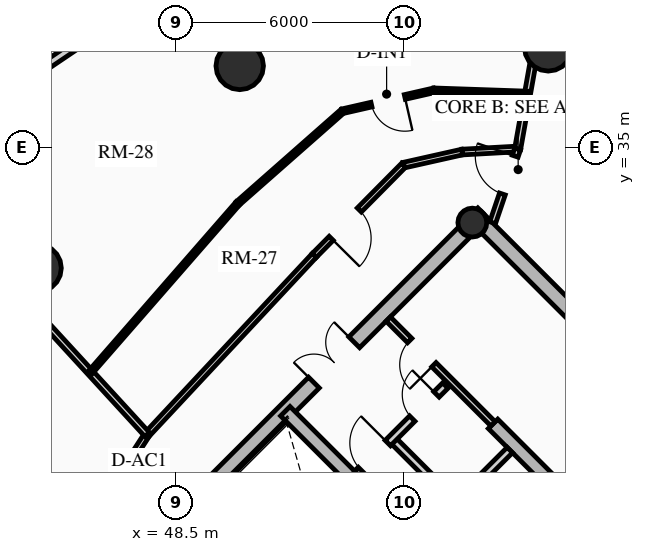
"""IFC4 building model, lengths in metres.
Left out: names, types, materials, properties, quantities, classifications, styles, units other than length and angle.
Written with IfcOpenShell. Run it as: python <this file> out.ifc"""

import sys

from ifc_helpers import new_model, si_unit, direction, frame, frame_2d, origin, origin_2d, place, context, subcontext, project, spatial, rectangle, circle, hollow_circle, extrude, source, transform, mapped, element, fill, save


model = new_model("IFC4")
c1 = context("Model", 3, precision=1e-05, world=origin(), true_north=direction((0.0, 1.0)))
c2 = subcontext(c1, "Body", "Model", "MODEL_VIEW")
j1 = project(units=[si_unit("LENGTHUNIT", "METRE"), si_unit("PLANEANGLEUNIT", "RADIAN")], contexts=[c1])
p1 = place(None, origin())
s1 = spatial("IfcSite", under=j1, at=p1, CompositionType="ELEMENT")
p2 = place(p1, origin())
s2 = spatial("IfcBuilding", under=s1, at=p2, CompositionType="ELEMENT")
p3 = place(p2, frame((0.0, 0.0, 160.33)))
s3 = spatial("IfcBuildingStorey", under=s2, at=p3, CompositionType="ELEMENT", Elevation=160.33)
p4 = place(p3, frame((66.268, 23.298, 0.0), z_axis=(0.0, 0.0, 1.0), x_axis=(-0.707106781187, 0.707106781187, 0.0)))
e1 = element("IfcWall", 1, at=p4, inside=s3, PredefinedType="SHEAR", context=c2, shape_type="SweptSolid", body=[
    extrude(rectangle(XDim=14.1, YDim=0.4, at=frame_2d((7.05, 0.0))), origin(), (0.0, 0.0, 1.0), 2.91),
])
p5 = place(p3, frame((48.873, 25.561, 0.0), z_axis=(0.0, 0.0, 1.0), x_axis=(0.707106781187, 0.707106781187, 0.0)))
e2 = element("IfcWall", 2, at=p5, inside=s3, PredefinedType="SHEAR", context=c2, shape_type="SweptSolid", body=[
    extrude(rectangle(XDim=10.7, YDim=0.4, at=frame_2d((5.35, 0.0))), origin(), (0.0, 0.0, 1.0), 2.91),
])
m1 = source(origin(), c2, "Body", "SweptSolid", [
    extrude(rectangle(XDim=1.5, YDim=2.02, at=frame_2d((0.75, 1.01))), frame((0.0, 0.21, 0.0), z_axis=(0.0, -1.0, 0.0), x_axis=(1.0, 0.0, 0.0)), (0.0, 0.0, 1.0), 0.42),
])
p6 = place(p5, frame((4.6, 0.0, 0.0)))
e3 = element("IfcOpeningElement", 3, at=p6, cuts=e2, PredefinedType="OPENING", context=c2, shape_type="MappedRepresentation", body=[
    mapped(m1, transform((0.0, 0.0, 0.0), x_axis=(1.0, 0.0, 0.0), y_axis=(0.0, 1.0, 0.0), z_axis=(0.0, 0.0, 1.0), scale=1.0)),
])
p7 = place(p3, frame((61.06, 18.373, 0.0), z_axis=(0.0, 0.0, 1.0), x_axis=(-0.707106781187, 0.707106781187, 0.0)))
e4 = element("IfcWall", 4, at=p7, inside=s3, PredefinedType="SHEAR", context=c2, shape_type="SweptSolid", body=[
    extrude(rectangle(XDim=13.7, YDim=0.35, at=frame_2d((6.85, 0.0))), origin(), (0.0, 0.0, 1.0), 2.91),
])
m2 = source(origin(), c2, "Body", "SweptSolid", [
    extrude(rectangle(XDim=1.1, YDim=2.015, at=frame_2d((0.55, 1.007))), frame((0.0, 0.185, 0.0), z_axis=(0.0, -1.0, 0.0), x_axis=(1.0, 0.0, 0.0)), (0.0, 0.0, 1.0), 0.37),
])
p8 = place(p7, frame((4.85, 0.0, 0.0)))
e5 = element("IfcOpeningElement", 5, at=p8, cuts=e4, PredefinedType="OPENING", context=c2, shape_type="MappedRepresentation", body=[
    mapped(m2, transform((0.0, 0.0, 0.0), x_axis=(1.0, 0.0, 0.0), y_axis=(0.0, 1.0, 0.0), z_axis=(0.0, 0.0, 1.0), scale=1.0)),
])
p9 = place(p7, frame((0.625, 0.0, 0.0)))
e6 = element("IfcOpeningElement", 6, at=p9, cuts=e4, PredefinedType="OPENING", context=c2, shape_type="MappedRepresentation", body=[
    mapped(m2, transform((0.0, 0.0, 0.0), x_axis=(1.0, 0.0, 0.0), y_axis=(0.0, 1.0, 0.0), z_axis=(0.0, 0.0, 1.0), scale=1.0)),
])
p10 = place(p7, frame((2.625, 0.0, 0.0)))
e7 = element("IfcOpeningElement", 7, at=p10, cuts=e4, PredefinedType="OPENING", context=c2, shape_type="MappedRepresentation", body=[
    mapped(m2, transform((0.0, 0.0, 0.0), x_axis=(1.0, 0.0, 0.0), y_axis=(0.0, 1.0, 0.0), z_axis=(0.0, 0.0, 1.0), scale=1.0)),
])
m3 = source(origin(), c2, "Body", "SweptSolid", [
    extrude(rectangle(XDim=1.15, YDim=2.02, at=frame_2d((0.575, 1.01))), frame((0.0, 0.185, 0.0), z_axis=(0.0, -1.0, 0.0), x_axis=(1.0, 0.0, 0.0)), (0.0, 0.0, 1.0), 0.37),
])
p11 = place(p7, frame((7.27, 0.0, 0.0)))
e8 = element("IfcOpeningElement", 8, at=p11, cuts=e4, PredefinedType="OPENING", context=c2, shape_type="MappedRepresentation", body=[
    mapped(m3, transform((0.0, 0.0, 0.0), x_axis=(1.0, 0.0, 0.0), y_axis=(0.0, 1.0, 0.0), z_axis=(0.0, 0.0, 1.0), scale=1.0)),
])
p12 = place(p3, frame((63.627, 20.94, 0.0), z_axis=(0.0, 0.0, 1.0), x_axis=(-0.707119496762, 0.707094065383, 0.0)))
e9 = element("IfcWall", 9, at=p12, inside=s3, PredefinedType="SHEAR", context=c2, shape_type="SweptSolid", body=[
    extrude(rectangle(XDim=9.6, YDim=0.35, at=frame_2d((4.8, 0.0))), origin(), (0.0, 0.0, 1.0), 2.91),
])
p13 = place(p12, frame((5.28, 0.0, 0.0)))
e10 = element("IfcOpeningElement", 10, at=p13, cuts=e9, PredefinedType="OPENING", context=c2, shape_type="MappedRepresentation", body=[
    mapped(m3, transform((0.0, 0.0, 0.0), x_axis=(1.0, 0.0, 0.0), y_axis=(0.0, 1.0, 0.0), z_axis=(0.0, 0.0, 1.0), scale=1.0)),
])
p14 = place(p3, frame((56.294, 33.024, 0.0), z_axis=(0.0, 0.0, 1.0), x_axis=(0.707106781187, 0.707106781187, 0.0)))
e11 = element("IfcColumn", 11, at=p14, inside=s3, PredefinedType="COLUMN", context=c2, shape_type="SweptSolid", body=[
    extrude(hollow_circle(Radius=0.38, WallThickness=0.032, at=origin_2d()), origin(), (0.0, 0.0, 1.0), 2.91),
])
for number, where, z_axis, x_axis in (
    (12, (58.291, 37.635, 0.0), (0.0, 0.0, 1.0), (1.0, 0.0, 0.0)),
    (13, (50.173, 37.146, 0.0), (0.0, 0.0, 1.0), (1.0, 0.0, 0.0)),
    (14, (44.854, 31.827, 0.0), (0.0, 0.0, 1.0), (1.0, 0.0, 0.0)),
):
    element("IfcColumn", number, at=place(p3, frame(where, z_axis=z_axis, x_axis=x_axis)), inside=s3, PredefinedType="USERDEFINED", context=c2, shape_type="SweptSolid", body=[
        extrude(circle(Radius=0.625, at=origin_2d()), origin(), (0.0, 0.0, 1.0), 2.91),
    ])
p15 = place(p3, frame((44.935, 37.065, 0.0), z_axis=(0.0, 0.0, 1.0), x_axis=(0.828739009952, 0.559635286042, 0.0)))
e15 = element("IfcWall", 15, at=p15, inside=s3, PredefinedType="SOLIDWALL", context=c2, shape_type="SweptSolid", body=[
    extrude(rectangle(XDim=4.569, YDim=0.22, at=frame_2d((2.284, 0.0))), origin(), (0.0, 0.0, 1.0), 2.245),
])
p16 = place(p3, frame((54.961, 24.719, 0.0), z_axis=(0.0, 0.0, 1.0), x_axis=(0.707106781187, 0.707106781187, 0.0)))
e16 = element("IfcWall", 16, at=p16, inside=s3, PredefinedType="PARTITIONING", context=c2, shape_type="SweptSolid", body=[
    extrude(rectangle(XDim=3.28, YDim=0.2, at=frame_2d((1.64, 0.0))), origin(), (0.0, 0.0, 1.0), 2.675),
])
m4 = source(origin(), c2, "Body", "SweptSolid", [
    extrude(rectangle(XDim=0.9, YDim=2.005, at=frame_2d((0.45, 1.002))), frame((0.0, 0.11, 0.0), z_axis=(0.0, -1.0, 0.0), x_axis=(1.0, 0.0, 0.0)), (0.0, 0.0, 1.0), 0.22),
])
p17 = place(p16, frame((0.16, 0.0, 0.0)))
e17 = element("IfcOpeningElement", 17, at=p17, cuts=e16, PredefinedType="OPENING", context=c2, shape_type="MappedRepresentation", body=[
    mapped(m4, transform((0.0, 0.0, 0.0), x_axis=(1.0, 0.0, 0.0), y_axis=(0.0, 1.0, 0.0), z_axis=(0.0, 0.0, 1.0), scale=1.0)),
])
p18 = place(p3, frame((55.874, 25.631, 0.0), z_axis=(0.0, 0.0, 1.0), x_axis=(-0.707157639372, 0.707055919343, 0.0)))
e18 = element("IfcWall", 18, at=p18, inside=s3, PredefinedType="PARTITIONING", context=c2, shape_type="SweptSolid", body=[
    extrude(rectangle(XDim=2.4, YDim=0.2, at=frame_2d((1.2, 0.0))), origin(), (0.0, 0.0, 1.0), 2.675),
])
p19 = place(p3, frame((53.264, 26.416, 0.0), z_axis=(0.0, 0.0, 1.0), x_axis=(0.707106781187, 0.707106781187, 0.0)))
e19 = element("IfcWall", 19, at=p19, inside=s3, PredefinedType="PARTITIONING", context=c2, shape_type="SweptSolid", body=[
    extrude(rectangle(XDim=3.28, YDim=0.2, at=frame_2d((1.64, 0.0))), origin(), (0.0, 0.0, 1.0), 2.675),
])
m5 = source(origin(), c2, "Body", "SweptSolid", [
    extrude(rectangle(XDim=1.0, YDim=2.015, at=frame_2d((0.5, 1.007))), frame((0.0, 0.11, 0.0), z_axis=(0.0, -1.0, 0.0), x_axis=(1.0, 0.0, 0.0)), (0.0, 0.0, 1.0), 0.22),
])
p20 = place(p19, frame((0.14, 0.0, 0.0)))
e20 = element("IfcOpeningElement", 20, at=p20, cuts=e19, PredefinedType="OPENING", context=c2, shape_type="MappedRepresentation", body=[
    mapped(m5, transform((0.0, 0.0, 0.0), x_axis=(1.0, 0.0, 0.0), y_axis=(0.0, 1.0, 0.0), z_axis=(0.0, 0.0, 1.0), scale=1.0)),
])
p21 = place(p19, frame((2.05, 0.0, 0.0)))
e21 = element("IfcOpeningElement", 21, at=p21, cuts=e19, PredefinedType="OPENING", context=c2, shape_type="MappedRepresentation", body=[
    mapped(m4, transform((0.0, 0.0, 0.0), x_axis=(1.0, 0.0, 0.0), y_axis=(0.0, 1.0, 0.0), z_axis=(0.0, 0.0, 1.0), scale=1.0)),
])
p22 = place(p3, frame((56.839, 27.728, 0.0), z_axis=(0.0, 0.0, 1.0), x_axis=(-0.707106781187, 0.707106781187, 0.0)))
e22 = element("IfcWall", 22, at=p22, inside=s3, PredefinedType="PARTITIONING", context=c2, shape_type="SweptSolid", body=[
    extrude(rectangle(XDim=3.9, YDim=0.16, at=frame_2d((1.95, 0.0))), origin(), (0.0, 0.0, 1.0), 2.675),
])
m6 = source(origin(), c2, "Body", "SweptSolid", [
    extrude(rectangle(XDim=0.9, YDim=2.005, at=frame_2d((0.45, 1.002))), frame((0.0, 0.09, 0.0), z_axis=(0.0, -1.0, 0.0), x_axis=(1.0, 0.0, 0.0)), (0.0, 0.0, 1.0), 0.18),
])
p23 = place(p22, frame((2.2, 0.0, 0.0)))
e23 = element("IfcOpeningElement", 23, at=p23, cuts=e22, PredefinedType="OPENING", context=c2, shape_type="MappedRepresentation", body=[
    mapped(m6, transform((0.0, 0.0, 0.0), x_axis=(1.0, 0.0, 0.0), y_axis=(0.0, 1.0, 0.0), z_axis=(0.0, 0.0, 1.0), scale=1.0)),
])
p24 = place(p3, frame((57.486, 34.96, 0.0), z_axis=(0.0, 0.0, 1.0), x_axis=(-0.998483871836, -0.055045051404, 0.0)))
e24 = element("IfcWall", 24, at=p24, inside=s3, PredefinedType="PARTITIONING", context=c2, shape_type="SweptSolid", body=[
    extrude(rectangle(XDim=1.464, YDim=0.15, at=frame_2d((0.732, 0.0))), origin(), (0.0, 0.0, 1.0), 2.245),
])
p25 = place(p3, frame((56.025, 34.88, 0.0), z_axis=(0.0, 0.0, 1.0), x_axis=(-0.975729093394, -0.218981132301, 0.0)))
e25 = element("IfcWall", 25, at=p25, inside=s3, PredefinedType="PARTITIONING", context=c2, shape_type="SweptSolid", body=[
    extrude(rectangle(XDim=1.575, YDim=0.15, at=frame_2d((0.788, 0.0))), origin(), (0.0, 0.0, 1.0), 2.245),
])
p26 = place(p3, frame((54.488, 34.535, 0.0), z_axis=(0.0, 0.0, 1.0), x_axis=(-0.703666289339, -0.710530613871, 0.0)))
e26 = element("IfcWall", 26, at=p26, inside=s3, PredefinedType="PARTITIONING", context=c2, shape_type="SweptSolid", body=[
    extrude(rectangle(XDim=3.343, YDim=0.15, at=frame_2d((1.672, 0.0))), origin(), (0.0, 0.0, 1.0), 2.245),
])
m7 = source(origin(), c2, "Body", "SweptSolid", [
    extrude(rectangle(XDim=1.05, YDim=2.015, at=frame_2d((0.525, 1.007))), frame((0.0, 0.085, 0.0), z_axis=(0.0, -1.0, 0.0), x_axis=(1.0, 0.0, 0.0)), (0.0, 0.0, 1.0), 0.17),
])
p27 = place(p26, frame((1.66, 0.0, 0.0)))
e27 = element("IfcOpeningElement", 27, at=p27, cuts=e26, PredefinedType="OPENING", context=c2, shape_type="MappedRepresentation", body=[
    mapped(m7, transform((0.0, 0.0, 0.0), x_axis=(1.0, 0.0, 0.0), y_axis=(0.0, 1.0, 0.0), z_axis=(0.0, 0.0, 1.0), scale=1.0)),
])
p28 = place(p3, frame((52.135, 32.159, 0.0), z_axis=(0.0, 0.0, 1.0), x_axis=(-0.682546302454, -0.730842353047, 0.0)))
e28 = element("IfcWall", 28, at=p28, inside=s3, PredefinedType="PARTITIONING", context=c2, shape_type="SweptSolid", body=[
    extrude(rectangle(XDim=6.445, YDim=0.15, at=frame_2d((3.223, 0.0))), origin(), (0.0, 0.0, 1.0), 2.245),
])
p29 = place(p3, frame((47.736, 27.449, 0.0), z_axis=(0.0, 0.0, 1.0), x_axis=(-0.542589259408, -0.839998152126, 0.0)))
e29 = element("IfcWall", 29, at=p29, inside=s3, PredefinedType="PARTITIONING", context=c2, shape_type="SweptSolid", body=[
    extrude(rectangle(XDim=1.912, YDim=0.15, at=frame_2d((0.956, 0.0))), origin(), (0.0, 0.0, 1.0), 2.245),
])
p30 = place(p3, frame((57.486, 34.96, 0.0), z_axis=(0.0, 0.0, 1.0), x_axis=(0.175432895983, 0.984491391027, 0.0)))
e30 = element("IfcWall", 30, at=p30, inside=s3, PredefinedType="PARTITIONING", context=c2, shape_type="SweptSolid", body=[
    extrude(rectangle(XDim=5.291, YDim=0.16, at=frame_2d((2.646, 0.0))), origin(), (0.0, 0.0, 1.0), 2.245),
])
p31 = place(p3, frame((47.736, 27.449, 0.0), z_axis=(0.0, 0.0, 1.0), x_axis=(-0.676056254668, 0.736850012231, 0.0)))
e31 = element("IfcWall", 31, at=p31, inside=s3, PredefinedType="PARTITIONING", context=c2, shape_type="SweptSolid", body=[
    extrude(rectangle(XDim=7.899, YDim=0.16, at=frame_2d((3.95, 0.0))), origin(), (0.0, 0.0, 1.0), 2.245),
])
p32 = place(p3, frame((56.828, 33.021, 0.0), z_axis=(0.0, 0.0, 1.0), x_axis=(0.321300161671, 0.94697740528, 0.0)))
e32 = element("IfcWall", 32, at=p32, inside=s3, PredefinedType="PARTITIONING", context=c2, shape_type="SweptSolid", body=[
    extrude(rectangle(XDim=2.049, YDim=0.16, at=frame_2d((1.024, 0.0))), origin(), (0.0, 0.0, 1.0), 2.245),
])
m8 = source(origin(), c2, "Body", "SweptSolid", [
    extrude(rectangle(XDim=1.05, YDim=2.015, at=frame_2d((0.525, 1.007))), frame((0.0, 0.09, 0.0), z_axis=(0.0, -1.0, 0.0), x_axis=(1.0, 0.0, 0.0)), (0.0, 0.0, 1.0), 0.18),
])
p33 = place(p32, frame((0.798, 0.0, 0.0)))
e33 = element("IfcOpeningElement", 33, at=p33, cuts=e32, PredefinedType="OPENING", context=c2, shape_type="MappedRepresentation", body=[
    mapped(m8, transform((0.0, 0.0, 0.0), x_axis=(1.0, 0.0, 0.0), y_axis=(0.0, 1.0, 0.0), z_axis=(0.0, 0.0, 1.0), scale=1.0)),
])
p34 = place(p3, frame((57.746, 36.419, 0.0), z_axis=(0.0, 0.0, 1.0), x_axis=(-0.999409872703, 0.03434976484, 0.0)))
e34 = element("IfcWall", 34, at=p34, inside=s3, PredefinedType="PARTITIONING", context=c2, shape_type="SweptSolid", body=[
    extrude(rectangle(XDim=2.466, YDim=0.125, at=frame_2d((1.233, 0.0))), origin(), (0.0, 0.0, 1.0), 2.245),
])
p35 = place(p3, frame((55.281, 36.504, 0.0), z_axis=(0.0, 0.0, 1.0), x_axis=(-0.974908832019, -0.222604513096, 0.0)))
e35 = element("IfcWall", 35, at=p35, inside=s3, PredefinedType="PARTITIONING", context=c2, shape_type="SweptSolid", body=[
    extrude(rectangle(XDim=2.468, YDim=0.125, at=frame_2d((1.234, 0.0))), origin(), (0.0, 0.0, 1.0), 2.245),
])
m9 = source(origin(), c2, "Body", "SweptSolid", [
    extrude(rectangle(XDim=0.9, YDim=2.005, at=frame_2d((0.45, 1.002))), frame((0.0, 0.073, 0.0), z_axis=(0.0, -1.0, 0.0), x_axis=(1.0, 0.0, 0.0)), (0.0, 0.0, 1.0), 0.145),
])
p36 = place(p35, frame((0.784, 0.0, 0.0)))
e36 = element("IfcOpeningElement", 36, at=p36, cuts=e35, PredefinedType="OPENING", context=c2, shape_type="MappedRepresentation", body=[
    mapped(m9, transform((0.0, 0.0, 0.0), x_axis=(1.0, 0.0, 0.0), y_axis=(0.0, 1.0, 0.0), z_axis=(0.0, 0.0, 1.0), scale=1.0)),
])
p37 = place(p3, frame((52.876, 35.954, 0.0), z_axis=(0.0, 0.0, 1.0), x_axis=(-0.750317340408, -0.661077823469, 0.0)))
e37 = element("IfcWall", 37, at=p37, inside=s3, PredefinedType="PARTITIONING", context=c2, shape_type="SweptSolid", body=[
    extrude(rectangle(XDim=3.669, YDim=0.125, at=frame_2d((1.834, 0.0))), origin(), (0.0, 0.0, 1.0), 2.245),
])
p38 = place(p3, frame((50.123, 33.529, 0.0), z_axis=(0.0, 0.0, 1.0), x_axis=(-0.657371249324, -0.753566878626, 0.0)))
e38 = element("IfcWall", 38, at=p38, inside=s3, PredefinedType="PARTITIONING", context=c2, shape_type="SweptSolid", body=[
    extrude(rectangle(XDim=5.906, YDim=0.125, at=frame_2d((2.953, 0.0))), origin(), (0.0, 0.0, 1.0), 2.245),
])
m10 = source(origin(), c2, "Body", "SweptSolid", [
    extrude(rectangle(XDim=1.5, YDim=2.02, at=frame_2d((0.75, 1.01))), frame((0.0, 0.025, 0.0), z_axis=(0.0, -1.0, 0.0), x_axis=(1.0, 0.0, 0.0)), (0.0, 0.0, 1.0), 0.05),
])
p39 = place(p6, origin())
e39 = element("IfcDoor", 39, at=p39, inside=s3, OperationType="DOUBLE_DOOR_SINGLE_SWING", PredefinedType="DOOR", context=c2, shape_type="MappedRepresentation", body=[
    mapped(m10, transform((0.0, 0.0, 0.0), x_axis=(1.0, 0.0, 0.0), y_axis=(0.0, 1.0, 0.0), z_axis=(0.0, 0.0, 1.0), scale=1.0)),
])
fill(e3, e39)
m11 = source(origin(), c2, "Body", "SweptSolid", [
    extrude(rectangle(XDim=1.0, YDim=2.015, at=frame_2d((0.5, 1.007))), frame((0.0, 0.025, 0.0), z_axis=(0.0, -1.0, 0.0), x_axis=(1.0, 0.0, 0.0)), (0.0, 0.0, 1.0), 0.05),
])
p40 = place(p20, origin())
e40 = element("IfcDoor", 40, at=p40, inside=s3, OperationType="SINGLE_SWING_RIGHT", PredefinedType="DOOR", context=c2, shape_type="MappedRepresentation", body=[
    mapped(m11, transform((0.0, 0.0, 0.0), x_axis=(1.0, 0.0, 0.0), y_axis=(0.0, 1.0, 0.0), z_axis=(0.0, 0.0, 1.0), scale=1.0)),
])
fill(e20, e40)
m12 = source(origin(), c2, "Body", "SweptSolid", [
    extrude(rectangle(XDim=0.9, YDim=2.005, at=frame_2d((0.45, 1.002))), frame((0.0, 0.025, 0.0), z_axis=(0.0, -1.0, 0.0), x_axis=(1.0, 0.0, 0.0)), (0.0, 0.0, 1.0), 0.05),
])
p41 = place(p21, origin())
e41 = element("IfcDoor", 41, at=p41, inside=s3, OperationType="SINGLE_SWING_RIGHT", PredefinedType="DOOR", context=c2, shape_type="MappedRepresentation", body=[
    mapped(m12, transform((0.0, 0.0, 0.0), x_axis=(1.0, 0.0, 0.0), y_axis=(0.0, 1.0, 0.0), z_axis=(0.0, 0.0, 1.0), scale=1.0)),
])
fill(e21, e41)
p42 = place(p23, origin())
e42 = element("IfcDoor", 42, at=p42, inside=s3, OperationType="SINGLE_SWING_LEFT", PredefinedType="DOOR", context=c2, shape_type="MappedRepresentation", body=[
    mapped(m12, transform((0.0, 0.0, 0.0), x_axis=(1.0, 0.0, 0.0), y_axis=(0.0, 1.0, 0.0), z_axis=(0.0, 0.0, 1.0), scale=1.0)),
])
fill(e23, e42)
m13 = source(origin(), c2, "Body", "SweptSolid", [
    extrude(rectangle(XDim=1.05, YDim=2.015, at=frame_2d((0.525, 1.007))), frame((0.0, 0.025, 0.0), z_axis=(0.0, -1.0, 0.0), x_axis=(1.0, 0.0, 0.0)), (0.0, 0.0, 1.0), 0.05),
])
p43 = place(p33, origin())
e43 = element("IfcDoor", 43, at=p43, inside=s3, OperationType="SINGLE_SWING_RIGHT", PredefinedType="DOOR", context=c2, shape_type="MappedRepresentation", body=[
    mapped(m13, transform((0.0, 0.0, 0.0), x_axis=(1.0, 0.0, 0.0), y_axis=(0.0, 1.0, 0.0), z_axis=(0.0, 0.0, 1.0), scale=1.0)),
])
fill(e33, e43)
p44 = place(p27, origin())
e44 = element("IfcDoor", 44, at=p44, inside=s3, OperationType="SINGLE_SWING_RIGHT", PredefinedType="DOOR", context=c2, shape_type="MappedRepresentation", body=[
    mapped(m13, transform((0.0, 0.0, 0.0), x_axis=(1.0, 0.0, 0.0), y_axis=(0.0, 1.0, 0.0), z_axis=(0.0, 0.0, 1.0), scale=1.0)),
])
fill(e27, e44)
p45 = place(p36, origin())
e45 = element("IfcDoor", 45, at=p45, inside=s3, OperationType="SINGLE_SWING_LEFT", PredefinedType="DOOR", context=c2, shape_type="MappedRepresentation", body=[
    mapped(m12, transform((0.0, 0.0, 0.0), x_axis=(1.0, 0.0, 0.0), y_axis=(0.0, 1.0, 0.0), z_axis=(0.0, 0.0, 1.0), scale=1.0)),
])
fill(e36, e45)
save(model, sys.argv[1])
